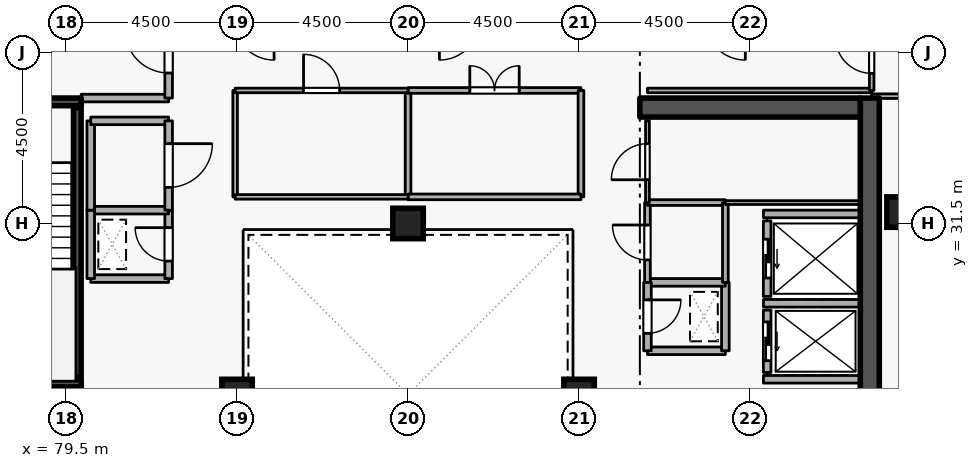
"""IFC4 building model, lengths in metres.
Left out: names, types, materials, properties, quantities, classifications, styles, units other than length and angle.
Written with IfcOpenShell. Run it as: python <this file> out.ifc"""

import sys

from ifc_helpers import new_model, si_unit, direction, frame, frame_2d, origin, origin_2d, place, context, subcontext, project, spatial, rectangle, extrude, element, fill, save


model = new_model("IFC4")
c1 = context("Model", 3, precision=1e-05, world=origin(), true_north=direction((0.0, 1.0)))
c2 = subcontext(c1, "Body", "Model", "MODEL_VIEW")
j1 = project(units=[si_unit("LENGTHUNIT", "METRE"), si_unit("PLANEANGLEUNIT", "RADIAN")], contexts=[c1])
p1 = place(None, origin())
s1 = spatial("IfcSite", under=j1, at=p1, CompositionType="ELEMENT")
p2 = place(p1, origin())
s2 = spatial("IfcBuilding", under=s1, at=p2, CompositionType="ELEMENT")
p3 = place(p2, frame((0.0, 0.0, 269.1)))
s3 = spatial("IfcBuildingStorey", under=s2, at=p3, CompositionType="ELEMENT", Elevation=269.1)
p4 = place(p3, frame((100.65, 19.2, 0.0), z_axis=(0.0, 0.0, 1.0), x_axis=(0.0, 1.0, 0.0)))
e1 = element("IfcWall", 1, at=p4, inside=s3, PredefinedType="SHEAR", context=c2, shape_type="SweptSolid", body=[
    extrude(rectangle(XDim=15.6, YDim=0.5, at=frame_2d((7.8, 0.0))), origin(), (0.0, 0.0, 1.0), 3.6),
])
p5 = place(p3, frame((94.6, 34.55, 0.0), z_axis=(0.0, 0.0, 1.0), x_axis=(1.0, 0.0, 0.0)))
e2 = element("IfcWall", 2, at=p5, inside=s3, PredefinedType="SHEAR", context=c2, shape_type="SweptSolid", body=[
    extrude(rectangle(XDim=5.8, YDim=0.5, at=frame_2d((2.9, 0.0))), origin(), (0.0, 0.0, 1.0), 3.6),
])
for number, where, z_axis, x_axis in (
    (3, (101.5, 31.8, 0.0), (0.0, 0.0, 1.0), (1.0, 0.0, 0.0)),
    (4, (93.0, 27.0, 0.0), (0.0, 0.0, 1.0), (1.0, 0.0, 0.0)),
    (5, (84.0, 27.0, 0.0), (0.0, 0.0, 1.0), (1.0, 0.0, 0.0)),
    (6, (88.5, 31.5, 0.0), (0.0, 0.0, 1.0), (1.0, 0.0, 0.0)),
):
    element("IfcColumn", number, at=place(p3, frame(where, z_axis=z_axis, x_axis=x_axis)), inside=s3, PredefinedType="COLUMN", context=c2, shape_type="SweptSolid", body=[
        extrude(rectangle(XDim=0.8, YDim=0.8, at=origin_2d()), origin(), (0.0, 0.0, 1.0), 3.6),
    ])
p6 = place(p3, frame((97.95, 29.22, 0.0), z_axis=(0.0, 0.0, 1.0), x_axis=(0.0, -1.0, 0.0)))
e7 = element("IfcWall", 7, at=p6, inside=s3, PredefinedType="STANDARD", context=c2, shape_type="SweptSolid", body=[
    extrude(rectangle(XDim=1.64, YDim=0.2, at=frame_2d((0.82, 0.0))), origin(), (0.0, 0.0, 1.0), 3.34),
])
p7 = place(p6, frame((0.31, 0.0, 0.0)))
e8 = element("IfcOpeningElement", 8, at=p7, cuts=e7, PredefinedType="OPENING", context=c2, shape_type="SweptSolid", body=[
    extrude(rectangle(XDim=1.02, YDim=2.06, at=frame_2d((0.51, 1.03))), frame((0.0, 0.11, 0.0), z_axis=(0.0, -1.0, 0.0), x_axis=(1.0, 0.0, 0.0)), (0.0, 0.0, 1.0), 0.22),
])
p8 = place(p3, frame((97.95, 31.57, 0.0), z_axis=(0.0, 0.0, 1.0), x_axis=(0.0, -1.0, 0.0)))
e9 = element("IfcWall", 9, at=p8, inside=s3, PredefinedType="STANDARD", context=c2, shape_type="SweptSolid", body=[
    extrude(rectangle(XDim=1.99, YDim=0.2, at=frame_2d((0.995, 0.0))), origin(), (0.0, 0.0, 1.0), 3.34),
])
p9 = place(p8, frame((0.485, 0.0, 0.0)))
e10 = element("IfcOpeningElement", 10, at=p9, cuts=e9, PredefinedType="OPENING", context=c2, shape_type="SweptSolid", body=[
    extrude(rectangle(XDim=1.02, YDim=2.06, at=frame_2d((0.51, 1.03))), frame((0.0, 0.11, 0.0), z_axis=(0.0, -1.0, 0.0), x_axis=(1.0, 0.0, 0.0)), (0.0, 0.0, 1.0), 0.22),
])
for number, where, z_axis, x_axis in (
    (11, (97.852, 29.4, 0.0), (0.0, 0.0, 1.0), (1.0, 0.0, 0.0)),
    (12, (97.852, 27.4, 0.0), (0.0, 0.0, 1.0), (1.0, 0.0, 0.0)),
    (13, (97.852, 31.75, 0.0), (0.0, 0.0, 1.0), (1.0, 0.0, 0.0)),
):
    element("IfcWall", number, at=place(p3, frame(where, z_axis=z_axis, x_axis=x_axis)), inside=s3, PredefinedType="STANDARD", context=c2, shape_type="SweptSolid", body=[
        extrude(rectangle(XDim=2.536, YDim=0.2, at=frame_2d((1.268, 0.0))), origin(), (0.0, 0.0, 1.0), 3.34),
    ])
p10 = place(p3, frame((76.55, 34.7, 0.0), z_axis=(0.0, 0.0, 1.0), x_axis=(1.0, 0.0, 0.0)))
e14 = element("IfcWall", 14, at=p10, inside=s3, PredefinedType="SHEAR", context=c2, shape_type="SweptSolid", body=[
    extrude(rectangle(XDim=3.35, YDim=0.2, at=frame_2d((1.675, 0.0))), origin(), (0.0, 0.0, 1.0), 3.6),
])
p11 = place(p10, frame((1.125, 0.0, 0.0)))
e15 = element("IfcOpeningElement", 15, at=p11, cuts=e14, PredefinedType="OPENING", context=c2, shape_type="SweptSolid", body=[
    extrude(rectangle(XDim=1.1, YDim=2.1, at=frame_2d((0.55, 1.05))), frame((0.0, 0.11, 0.0), z_axis=(0.0, -1.0, 0.0), x_axis=(1.0, 0.0, 0.0)), (0.0, 0.0, 1.0), 0.22),
])
p12 = place(p3, frame((79.9, 27.3, 0.0), z_axis=(0.0, 0.0, 1.0), x_axis=(-1.0, 0.0, 0.0)))
e16 = element("IfcWall", 16, at=p12, inside=s3, PredefinedType="SHEAR", context=c2, shape_type="SweptSolid", body=[
    extrude(rectangle(XDim=3.35, YDim=0.2, at=frame_2d((1.675, 0.0))), origin(), (0.0, 0.0, 1.0), 3.6),
])
p13 = place(p3, frame((79.797, 27.45, 0.0), z_axis=(0.0, 0.0, 1.0), x_axis=(0.0, 1.0, 0.0)))
e17 = element("IfcWall", 17, at=p13, inside=s3, PredefinedType="SHEAR", context=c2, shape_type="SweptSolid", body=[
    extrude(rectangle(XDim=7.1, YDim=0.2, at=frame_2d((3.55, 0.0))), origin(), (0.0, 0.0, 1.0), 3.6),
])
p14 = place(p3, frame((79.9, 34.8, 0.0), z_axis=(0.0, 0.0, 1.0), x_axis=(1.0, 0.0, 0.0)))
e18 = element("IfcWall", 18, at=p14, inside=s3, PredefinedType="STANDARD", context=c2, shape_type="SweptSolid", body=[
    extrude(rectangle(XDim=2.3, YDim=0.2, at=frame_2d((1.15, 0.0))), origin(), (0.0, 0.0, 1.0), 2.545),
])
p15 = place(p3, frame((82.2, 34.8, 0.0), z_axis=(0.0, 0.0, 1.0), x_axis=(0.0, 1.0, 0.0)))
e19 = element("IfcWall", 19, at=p15, inside=s3, PredefinedType="STANDARD", context=c2, shape_type="SweptSolid", body=[
    extrude(rectangle(XDim=2.5, YDim=0.2, at=frame_2d((1.25, 0.0))), origin(), (0.0, 0.0, 1.0), 3.34),
])
p16 = place(p15, frame((0.66, 0.0, 0.0)))
e20 = element("IfcOpeningElement", 20, at=p16, cuts=e19, PredefinedType="OPENING", context=c2, shape_type="SweptSolid", body=[
    extrude(rectangle(XDim=1.15, YDim=2.1, at=frame_2d((0.575, 1.05))), frame((0.0, 0.11, 0.0), z_axis=(0.0, -1.0, 0.0), x_axis=(1.0, 0.0, 0.0)), (0.0, 0.0, 1.0), 0.22),
])
p17 = place(p3, frame((94.8, 28.15, 0.0), z_axis=(0.0, 0.0, 1.0), x_axis=(1.0, 0.0, 0.0)))
e21 = element("IfcWall", 21, at=p17, inside=s3, PredefinedType="STANDARD", context=c2, shape_type="SweptSolid", body=[
    extrude(rectangle(XDim=2.05, YDim=0.2, at=frame_2d((1.025, 0.0))), origin(), (0.0, 0.0, 1.0), 3.34),
])
p18 = place(p3, frame((96.85, 28.15, 0.0), z_axis=(0.0, 0.0, 1.0), x_axis=(0.0, 1.0, 0.0)))
e22 = element("IfcWall", 22, at=p18, inside=s3, PredefinedType="STANDARD", context=c2, shape_type="SweptSolid", body=[
    extrude(rectangle(XDim=1.8, YDim=0.2, at=frame_2d((0.9, 0.0))), origin(), (0.0, 0.0, 1.0), 3.34),
])
p19 = place(p3, frame((96.85, 29.95, 0.0), z_axis=(0.0, 0.0, 1.0), x_axis=(-1.0, 0.0, 0.0)))
e23 = element("IfcWall", 23, at=p19, inside=s3, PredefinedType="STANDARD", context=c2, shape_type="SweptSolid", body=[
    extrude(rectangle(XDim=2.05, YDim=0.2, at=frame_2d((1.025, 0.0))), origin(), (0.0, 0.0, 1.0), 3.34),
])
p20 = place(p3, frame((94.8, 29.95, 0.0), z_axis=(0.0, 0.0, 1.0), x_axis=(0.0, -1.0, 0.0)))
e24 = element("IfcWall", 24, at=p20, inside=s3, PredefinedType="STANDARD", context=c2, shape_type="SweptSolid", body=[
    extrude(rectangle(XDim=1.8, YDim=0.2, at=frame_2d((0.9, 0.0))), origin(), (0.0, 0.0, 1.0), 3.34),
])
p21 = place(p20, frame((0.46, 0.0, 0.0)))
e25 = element("IfcOpeningElement", 25, at=p21, cuts=e24, PredefinedType="OPENING", context=c2, shape_type="SweptSolid", body=[
    extrude(rectangle(XDim=0.88, YDim=2.04, at=frame_2d((0.44, 1.02))), frame((0.0, 0.11, 0.0), z_axis=(0.0, -1.0, 0.0), x_axis=(1.0, 0.0, 0.0)), (0.0, 0.0, 1.0), 0.22),
])
p22 = place(p3, frame((80.15, 30.05, 0.0), z_axis=(0.0, 0.0, 1.0), x_axis=(1.0, 0.0, 0.0)))
e26 = element("IfcWall", 26, at=p22, inside=s3, PredefinedType="STANDARD", context=c2, shape_type="SweptSolid", body=[
    extrude(rectangle(XDim=2.05, YDim=0.2, at=frame_2d((1.025, 0.0))), origin(), (0.0, 0.0, 1.0), 3.34),
])
p23 = place(p3, frame((82.2, 30.05, 0.0), z_axis=(0.0, 0.0, 1.0), x_axis=(0.0, 1.0, 0.0)))
e27 = element("IfcWall", 27, at=p23, inside=s3, PredefinedType="STANDARD", context=c2, shape_type="SweptSolid", body=[
    extrude(rectangle(XDim=1.8, YDim=0.2, at=frame_2d((0.9, 0.0))), origin(), (0.0, 0.0, 1.0), 3.34),
])
p24 = place(p23, frame((0.46, 0.0, 0.0)))
e28 = element("IfcOpeningElement", 28, at=p24, cuts=e27, PredefinedType="OPENING", context=c2, shape_type="SweptSolid", body=[
    extrude(rectangle(XDim=0.88, YDim=2.04, at=frame_2d((0.44, 1.02))), frame((0.0, 0.11, 0.0), z_axis=(0.0, -1.0, 0.0), x_axis=(1.0, 0.0, 0.0)), (0.0, 0.0, 1.0), 0.22),
])
p25 = place(p3, frame((82.2, 31.85, 0.0), z_axis=(0.0, 0.0, 1.0), x_axis=(-1.0, 0.0, 0.0)))
e29 = element("IfcWall", 29, at=p25, inside=s3, PredefinedType="STANDARD", context=c2, shape_type="SweptSolid", body=[
    extrude(rectangle(XDim=2.05, YDim=0.2, at=frame_2d((1.025, 0.0))), origin(), (0.0, 0.0, 1.0), 3.34),
])
p26 = place(p3, frame((80.15, 31.85, 0.0), z_axis=(0.0, 0.0, 1.0), x_axis=(0.0, -1.0, 0.0)))
e30 = element("IfcWall", 30, at=p26, inside=s3, PredefinedType="STANDARD", context=c2, shape_type="SweptSolid", body=[
    extrude(rectangle(XDim=1.8, YDim=0.2, at=frame_2d((0.9, 0.0))), origin(), (0.0, 0.0, 1.0), 3.34),
])
p27 = place(p3, frame((80.15, 31.85, 0.0), z_axis=(0.0, 0.0, 1.0), x_axis=(0.0, 1.0, 0.0)))
e31 = element("IfcWall", 31, at=p27, inside=s3, PredefinedType="STANDARD", context=c2, shape_type="SweptSolid", body=[
    extrude(rectangle(XDim=2.35, YDim=0.2, at=frame_2d((1.175, 0.0))), origin(), (0.0, 0.0, 1.0), 3.34),
])
p28 = place(p3, frame((80.15, 34.2, 0.0), z_axis=(0.0, 0.0, 1.0), x_axis=(1.0, 0.0, 0.0)))
e32 = element("IfcWall", 32, at=p28, inside=s3, PredefinedType="STANDARD", context=c2, shape_type="SweptSolid", body=[
    extrude(rectangle(XDim=2.05, YDim=0.2, at=frame_2d((1.025, 0.0))), origin(), (0.0, 0.0, 1.0), 2.545),
])
p29 = place(p3, frame((82.2, 34.2, 0.0), z_axis=(0.0, 0.0, 1.0), x_axis=(0.0, -1.0, 0.0)))
e33 = element("IfcWall", 33, at=p29, inside=s3, PredefinedType="STANDARD", context=c2, shape_type="SweptSolid", body=[
    extrude(rectangle(XDim=2.35, YDim=0.2, at=frame_2d((1.175, 0.0))), origin(), (0.0, 0.0, 1.0), 3.34),
])
p30 = place(p29, frame((0.6, 0.0, 0.0)))
e34 = element("IfcOpeningElement", 34, at=p30, cuts=e33, PredefinedType="OPENING", context=c2, shape_type="SweptSolid", body=[
    extrude(rectangle(XDim=1.15, YDim=2.1, at=frame_2d((0.575, 1.05))), frame((0.0, 0.11, 0.0), z_axis=(0.0, -1.0, 0.0), x_axis=(1.0, 0.0, 0.0)), (0.0, 0.0, 1.0), 0.22),
])
p31 = place(p3, frame((94.8, 29.95, 0.0), z_axis=(0.0, 0.0, 1.0), x_axis=(0.0, 1.0, 0.0)))
e35 = element("IfcWall", 35, at=p31, inside=s3, PredefinedType="PARTITIONING", context=c2, shape_type="SweptSolid", body=[
    extrude(rectangle(XDim=2.1, YDim=0.15, at=frame_2d((1.05, 0.0))), origin(), (0.0, 0.0, 1.0), 3.34),
])
p32 = place(p31, frame((0.59, 0.0, 0.0)))
e36 = element("IfcOpeningElement", 36, at=p32, cuts=e35, PredefinedType="OPENING", context=c2, shape_type="SweptSolid", body=[
    extrude(rectangle(XDim=0.92, YDim=2.08, at=frame_2d((0.46, 1.04))), frame((0.0, 0.085, 0.0), z_axis=(0.0, -1.0, 0.0), x_axis=(1.0, 0.0, 0.0)), (0.0, 0.0, 1.0), 0.17),
])
p33 = place(p3, frame((94.8, 32.05, 0.0), z_axis=(0.0, 0.0, 1.0), x_axis=(1.0, 0.0, 0.0)))
e37 = element("IfcWall", 37, at=p33, inside=s3, PredefinedType="PARTITIONING", context=c2, shape_type="SweptSolid", body=[
    extrude(rectangle(XDim=2.05, YDim=0.15, at=frame_2d((1.025, 0.0))), origin(), (0.0, 0.0, 1.0), 3.34),
])
p34 = place(p3, frame((96.85, 32.05, 0.0), z_axis=(0.0, 0.0, 1.0), x_axis=(0.0, -1.0, 0.0)))
e38 = element("IfcWall", 38, at=p34, inside=s3, PredefinedType="PARTITIONING", context=c2, shape_type="SweptSolid", body=[
    extrude(rectangle(XDim=2.1, YDim=0.15, at=frame_2d((1.05, 0.0))), origin(), (0.0, 0.0, 1.0), 3.34),
])
p35 = place(p3, frame((94.8, 32.05, 0.0), z_axis=(0.0, 0.0, 1.0), x_axis=(0.0, 1.0, 0.0)))
e39 = element("IfcWall", 39, at=p35, inside=s3, PredefinedType="PARTITIONING", context=c2, shape_type="SweptSolid", body=[
    extrude(rectangle(XDim=2.15, YDim=0.1, at=frame_2d((1.075, 0.0))), origin(), (0.0, 0.0, 1.0), 3.34),
])
p36 = place(p35, frame((0.6, 0.0, 0.0)))
e40 = element("IfcOpeningElement", 40, at=p36, cuts=e39, PredefinedType="OPENING", context=c2, shape_type="SweptSolid", body=[
    extrude(rectangle(XDim=0.95, YDim=2.1, at=frame_2d((0.475, 1.05))), frame((0.0, 0.06, 0.0), z_axis=(0.0, -1.0, 0.0), x_axis=(1.0, 0.0, 0.0)), (0.0, 0.0, 1.0), 0.12),
])
p37 = place(p3, frame((100.4, 32.05, 0.0), z_axis=(0.0, 0.0, 1.0), x_axis=(-1.0, 0.0, 0.0)))
e41 = element("IfcWall", 41, at=p37, inside=s3, PredefinedType="PARTITIONING", context=c2, shape_type="SweptSolid", body=[
    extrude(rectangle(XDim=3.55, YDim=0.1, at=frame_2d((1.775, 0.0))), origin(), (0.0, 0.0, 1.0), 3.34),
])
p38 = place(p3, frame((94.8, 35.0, 0.0), z_axis=(0.0, 0.0, 1.0), x_axis=(1.0, 0.0, 0.0)))
e42 = element("IfcWall", 42, at=p38, inside=s3, PredefinedType="PARTITIONING", context=c2, shape_type="SweptSolid", body=[
    extrude(rectangle(XDim=5.9, YDim=0.12, at=frame_2d((2.95, 0.0))), origin(), (0.0, 0.0, 1.0), 3.34),
])
p39 = place(p3, frame((100.7, 35.0, 0.0), z_axis=(0.0, 0.0, 1.0), x_axis=(0.0, 1.0, 0.0)))
e43 = element("IfcWall", 43, at=p39, inside=s3, PredefinedType="PARTITIONING", context=c2, shape_type="SweptSolid", body=[
    extrude(rectangle(XDim=1.85, YDim=0.12, at=frame_2d((0.925, 0.0))), origin(), (0.0, 0.0, 1.0), 3.34),
])
p40 = place(p39, frame((0.45, 0.0, 0.0)))
e44 = element("IfcOpeningElement", 44, at=p40, cuts=e43, PredefinedType="OPENING", context=c2, shape_type="SweptSolid", body=[
    extrude(rectangle(XDim=0.95, YDim=2.1, at=frame_2d((0.475, 1.05))), frame((0.0, 0.07, 0.0), z_axis=(0.0, -1.0, 0.0), x_axis=(1.0, 0.0, 0.0)), (0.0, 0.0, 1.0), 0.14),
])
p41 = place(p3, frame((112.22, 34.85, 0.0), z_axis=(0.0, 0.0, 1.0), x_axis=(-1.0, 0.0, 0.0)))
e45 = element("IfcWall", 45, at=p41, inside=s3, PredefinedType="PARTITIONING", context=c2, shape_type="SweptSolid", body=[
    extrude(rectangle(XDim=11.52, YDim=0.12, at=frame_2d((5.76, 0.0))), origin(), (0.0, 0.0, 1.0), 3.34),
])
p42 = place(p3, frame((88.5, 32.2, 0.0), z_axis=(0.0, 0.0, 1.0), x_axis=(0.0, 1.0, 0.0)))
e46 = element("IfcWall", 46, at=p42, inside=s3, PredefinedType="PARTITIONING", context=c2, shape_type="SweptSolid", body=[
    extrude(rectangle(XDim=2.8, YDim=0.15, at=frame_2d((1.4, 0.0))), origin(), (0.0, 0.0, 1.0), 3.34),
])
p43 = place(p3, frame((88.5, 35.0, 0.0), z_axis=(0.0, 0.0, 1.0), x_axis=(1.0, 0.0, 0.0)))
e47 = element("IfcWall", 47, at=p43, inside=s3, PredefinedType="PARTITIONING", context=c2, shape_type="SweptSolid", body=[
    extrude(rectangle(XDim=4.55, YDim=0.15, at=frame_2d((2.275, 0.0))), origin(), (0.0, 0.0, 1.0), 3.34),
])
p44 = place(p43, frame((1.625, 0.0, 0.0)))
e48 = element("IfcOpeningElement", 48, at=p44, cuts=e47, PredefinedType="OPENING", context=c2, shape_type="SweptSolid", body=[
    extrude(rectangle(XDim=1.3, YDim=2.12, at=frame_2d((0.65, 1.06))), frame((0.0, 0.085, 0.0), z_axis=(0.0, -1.0, 0.0), x_axis=(1.0, 0.0, 0.0)), (0.0, 0.0, 1.0), 0.17),
])
p45 = place(p3, frame((93.05, 35.0, 0.0), z_axis=(0.0, 0.0, 1.0), x_axis=(0.0, -1.0, 0.0)))
e49 = element("IfcWall", 49, at=p45, inside=s3, PredefinedType="PARTITIONING", context=c2, shape_type="SweptSolid", body=[
    extrude(rectangle(XDim=2.8, YDim=0.15, at=frame_2d((1.4, 0.0))), origin(), (0.0, 0.0, 1.0), 3.34),
])
p46 = place(p3, frame((93.05, 32.2, 0.0), z_axis=(0.0, 0.0, 1.0), x_axis=(-1.0, 0.0, 0.0)))
e50 = element("IfcWall", 50, at=p46, inside=s3, PredefinedType="PARTITIONING", context=c2, shape_type="SweptSolid", body=[
    extrude(rectangle(XDim=4.55, YDim=0.15, at=frame_2d((2.275, 0.0))), origin(), (0.0, 0.0, 1.0), 3.34),
])
p47 = place(p3, frame((83.95, 32.2, 0.0), z_axis=(0.0, 0.0, 1.0), x_axis=(0.0, 1.0, 0.0)))
e51 = element("IfcWall", 51, at=p47, inside=s3, PredefinedType="PARTITIONING", context=c2, shape_type="SweptSolid", body=[
    extrude(rectangle(XDim=2.8, YDim=0.12, at=frame_2d((1.4, 0.0))), origin(), (0.0, 0.0, 1.0), 3.34),
])
p48 = place(p3, frame((83.95, 35.0, 0.0), z_axis=(0.0, 0.0, 1.0), x_axis=(1.0, 0.0, 0.0)))
e52 = element("IfcWall", 52, at=p48, inside=s3, PredefinedType="PARTITIONING", context=c2, shape_type="SweptSolid", body=[
    extrude(rectangle(XDim=4.55, YDim=0.12, at=frame_2d((2.275, 0.0))), origin(), (0.0, 0.0, 1.0), 3.34),
])
p49 = place(p48, frame((1.8, 0.0, 0.0)))
e53 = element("IfcOpeningElement", 53, at=p49, cuts=e52, PredefinedType="OPENING", context=c2, shape_type="SweptSolid", body=[
    extrude(rectangle(XDim=0.95, YDim=2.1, at=frame_2d((0.475, 1.05))), frame((0.0, 0.07, 0.0), z_axis=(0.0, -1.0, 0.0), x_axis=(1.0, 0.0, 0.0)), (0.0, 0.0, 1.0), 0.14),
])
p50 = place(p3, frame((88.5, 32.2, 0.0), z_axis=(0.0, 0.0, 1.0), x_axis=(-1.0, 0.0, 0.0)))
e54 = element("IfcWall", 54, at=p50, inside=s3, PredefinedType="PARTITIONING", context=c2, shape_type="SweptSolid", body=[
    extrude(rectangle(XDim=4.55, YDim=0.12, at=frame_2d((2.275, 0.0))), origin(), (0.0, 0.0, 1.0), 3.34),
])
p51 = place(p7, origin())
e55 = element("IfcDoor", 55, at=p51, inside=s3, OperationType="SLIDING_TO_LEFT", PredefinedType="DOOR", context=c2, shape_type="SweptSolid", body=[
    extrude(rectangle(XDim=1.02, YDim=2.06, at=frame_2d((0.51, 1.03))), frame((0.0, 0.025, 0.0), z_axis=(0.0, -1.0, 0.0), x_axis=(1.0, 0.0, 0.0)), (0.0, 0.0, 1.0), 0.05),
])
fill(e8, e55)
p52 = place(p9, origin())
e56 = element("IfcDoor", 56, at=p52, inside=s3, OperationType="SLIDING_TO_LEFT", PredefinedType="DOOR", context=c2, shape_type="SweptSolid", body=[
    extrude(rectangle(XDim=1.02, YDim=2.06, at=frame_2d((0.51, 1.03))), frame((0.0, 0.025, 0.0), z_axis=(0.0, -1.0, 0.0), x_axis=(1.0, 0.0, 0.0)), (0.0, 0.0, 1.0), 0.05),
])
fill(e10, e56)
p53 = place(p16, origin())
e57 = element("IfcDoor", 57, at=p53, inside=s3, OperationType="SINGLE_SWING_RIGHT", PredefinedType="DOOR", context=c2, shape_type="SweptSolid", body=[
    extrude(rectangle(XDim=1.15, YDim=2.1, at=frame_2d((0.575, 1.05))), frame((0.0, 0.025, 0.0), z_axis=(0.0, -1.0, 0.0), x_axis=(1.0, 0.0, 0.0)), (0.0, 0.0, 1.0), 0.05),
])
fill(e20, e57)
p54 = place(p21, origin())
e58 = element("IfcDoor", 58, at=p54, inside=s3, OperationType="SINGLE_SWING_LEFT", PredefinedType="DOOR", context=c2, shape_type="SweptSolid", body=[
    extrude(rectangle(XDim=0.88, YDim=2.04, at=frame_2d((0.44, 1.02))), frame((0.0, 0.025, 0.0), z_axis=(0.0, -1.0, 0.0), x_axis=(1.0, 0.0, 0.0)), (0.0, 0.0, 1.0), 0.05),
])
fill(e25, e58)
p55 = place(p24, origin())
e59 = element("IfcDoor", 59, at=p55, inside=s3, OperationType="SINGLE_SWING_RIGHT", PredefinedType="DOOR", context=c2, shape_type="SweptSolid", body=[
    extrude(rectangle(XDim=0.88, YDim=2.04, at=frame_2d((0.44, 1.02))), frame((0.0, 0.025, 0.0), z_axis=(0.0, -1.0, 0.0), x_axis=(1.0, 0.0, 0.0)), (0.0, 0.0, 1.0), 0.05),
])
fill(e28, e59)
p56 = place(p32, origin())
e60 = element("IfcDoor", 60, at=p56, inside=s3, OperationType="SINGLE_SWING_RIGHT", PredefinedType="DOOR", context=c2, shape_type="SweptSolid", body=[
    extrude(rectangle(XDim=0.92, YDim=2.08, at=frame_2d((0.46, 1.04))), frame((0.0, 0.025, 0.0), z_axis=(0.0, -1.0, 0.0), x_axis=(1.0, 0.0, 0.0)), (0.0, 0.0, 1.0), 0.05),
])
fill(e36, e60)
p57 = place(p36, origin())
e61 = element("IfcDoor", 61, at=p57, inside=s3, OperationType="SINGLE_SWING_LEFT", PredefinedType="DOOR", context=c2, shape_type="SweptSolid", body=[
    extrude(rectangle(XDim=0.95, YDim=2.1, at=frame_2d((0.475, 1.05))), frame((0.0, 0.025, 0.0), z_axis=(0.0, -1.0, 0.0), x_axis=(1.0, 0.0, 0.0)), (0.0, 0.0, 1.0), 0.05),
])
fill(e40, e61)
p58 = place(p30, origin())
e62 = element("IfcDoor", 62, at=p58, inside=s3, OperationType="SINGLE_SWING_LEFT", PredefinedType="DOOR", context=c2, shape_type="SweptSolid", body=[
    extrude(rectangle(XDim=1.15, YDim=2.1, at=frame_2d((0.575, 1.05))), frame((0.0, 0.025, 0.0), z_axis=(0.0, -1.0, 0.0), x_axis=(1.0, 0.0, 0.0)), (0.0, 0.0, 1.0), 0.05),
])
fill(e34, e62)
p59 = place(p40, origin())
e63 = element("IfcDoor", 63, at=p59, inside=s3, OperationType="SINGLE_SWING_RIGHT", PredefinedType="DOOR", context=c2, shape_type="SweptSolid", body=[
    extrude(rectangle(XDim=0.95, YDim=2.1, at=frame_2d((0.475, 1.05))), frame((0.0, 0.025, 0.0), z_axis=(0.0, -1.0, 0.0), x_axis=(1.0, 0.0, 0.0)), (0.0, 0.0, 1.0), 0.05),
])
fill(e44, e63)
p60 = place(p44, origin())
e64 = element("IfcDoor", 64, at=p60, inside=s3, OperationType="DOUBLE_DOOR_SINGLE_SWING", PredefinedType="DOOR", context=c2, shape_type="SweptSolid", body=[
    extrude(rectangle(XDim=1.3, YDim=2.12, at=frame_2d((0.65, 1.06))), frame((0.0, 0.025, 0.0), z_axis=(0.0, -1.0, 0.0), x_axis=(1.0, 0.0, 0.0)), (0.0, 0.0, 1.0), 0.05),
])
fill(e48, e64)
p61 = place(p49, origin())
e65 = element("IfcDoor", 65, at=p61, inside=s3, OperationType="SINGLE_SWING_LEFT", PredefinedType="DOOR", context=c2, shape_type="SweptSolid", body=[
    extrude(rectangle(XDim=0.95, YDim=2.1, at=frame_2d((0.475, 1.05))), frame((0.0, 0.025, 0.0), z_axis=(0.0, -1.0, 0.0), x_axis=(1.0, 0.0, 0.0)), (0.0, 0.0, 1.0), 0.05),
])
fill(e53, e65)
save(model, sys.argv[1])
